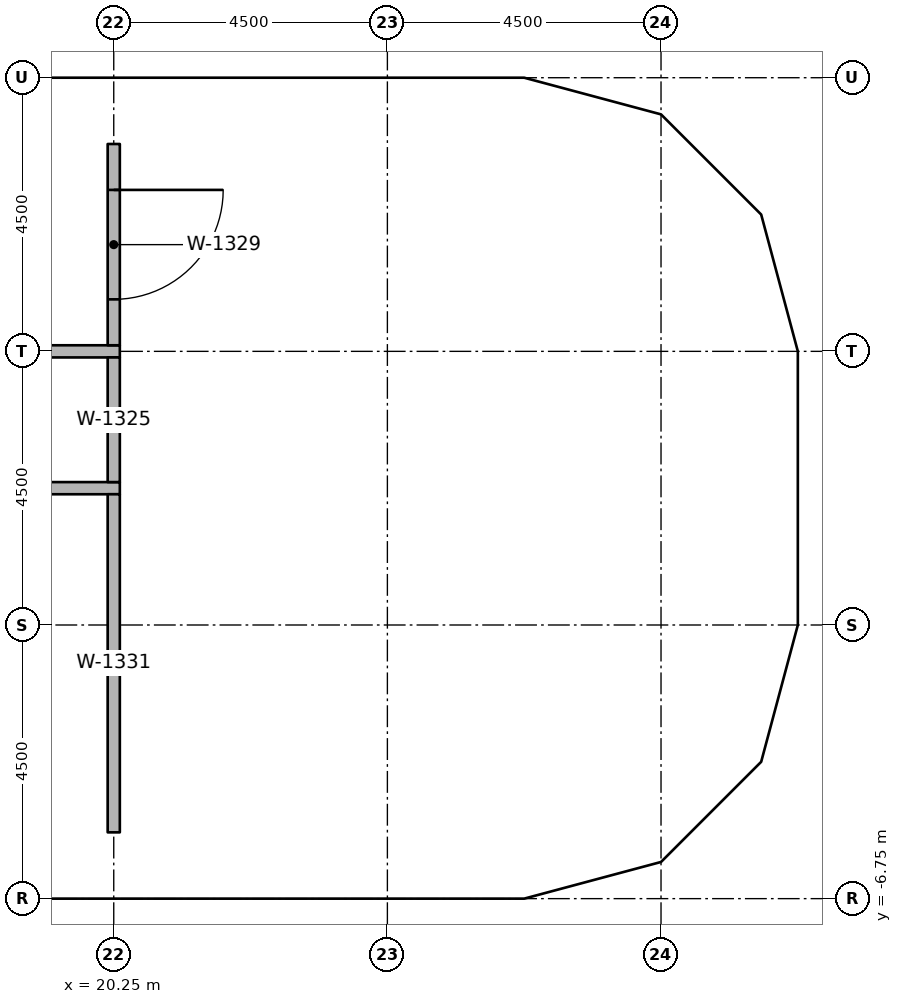
"""IFC4 building model, lengths in metres.
Left out: names, types, materials, properties, quantities, classifications, styles, units other than length and angle.
Written with IfcOpenShell. Run it as: python <this file> out.ifc"""

import sys

from ifc_helpers import new_model, si_unit, direction, frame, frame_2d, origin, origin_2d, place, context, subcontext, project, spatial, rectangle, extrude, element, fill, save


model = new_model("IFC4")
c1 = context("Model", 3, precision=1e-05, world=origin(), true_north=direction((0.0, 1.0)))
c2 = subcontext(c1, "Body", "Model", "MODEL_VIEW")
j1 = project(units=[si_unit("LENGTHUNIT", "METRE"), si_unit("PLANEANGLEUNIT", "RADIAN")], contexts=[c1])
p1 = place(None, origin())
s1 = spatial("IfcSite", under=j1, at=p1, CompositionType="ELEMENT")
p2 = place(p1, origin())
s2 = spatial("IfcBuilding", under=s1, at=p2, CompositionType="ELEMENT")
p3 = place(p2, frame((0.0, 0.0, 132.2)))
s3 = spatial("IfcBuildingStorey", under=s2, at=p3, CompositionType="ELEMENT", Elevation=132.2)
for number, where, z_axis, x_axis in (
    (1, (20.25, -6.11, 0.0), (0.0, 0.0, 1.0), (1.0, 0.0, 0.0)),
    (2, (20.25, 6.11, 0.0), (0.0, 0.0, 1.0), (1.0, 0.0, 0.0)),
    (3, (24.75, -6.11, 0.0), (0.0, 0.0, 1.0), (1.0, 0.0, 0.0)),
    (4, (24.75, 6.11, 0.0), (0.0, 0.0, 1.0), (1.0, 0.0, 0.0)),
    (5, (28.908, -5.475, 0.0), (0.0, 0.0, 1.0), (1.0, 0.0, 0.0)),
    (6, (28.67, -2.25, 0.0), (0.0, 0.0, 1.0), (1.0, 0.0, 0.0)),
    (7, (28.67, 2.25, 0.0), (0.0, 0.0, 1.0), (1.0, 0.0, 0.0)),
    (8, (28.908, 5.475, 0.0), (0.0, 0.0, 1.0), (1.0, 0.0, 0.0)),
):
    element("IfcColumn", number, at=place(p3, frame(where, z_axis=z_axis, x_axis=x_axis)), inside=s3, PredefinedType="COLUMN", context=c2, shape_type="SweptSolid", body=[
        extrude(rectangle(XDim=0.9, YDim=0.9, at=origin_2d()), origin(), (0.0, 0.0, 1.0), 3.65),
    ])
p4 = place(p3, frame((15.65, 2.25, 0.0), z_axis=(0.0, 0.0, 1.0), x_axis=(1.0, 0.0, 0.0)))
e9 = element("IfcWall", 9, at=p4, inside=s3, PredefinedType="PARTITIONING", context=c2, shape_type="SweptSolid", body=[
    extrude(rectangle(XDim=4.7, YDim=0.2, at=frame_2d((2.35, 0.0))), origin(), (0.0, 0.0, 1.0), 2.738),
])
p5 = place(p4, frame((1.85, 0.0, 0.0)))
e10 = element("IfcOpeningElement", 10, at=p5, cuts=e9, PredefinedType="OPENING", context=c2, shape_type="SweptSolid", body=[
    extrude(rectangle(XDim=1.0, YDim=2.1, at=frame_2d((0.5, 1.05))), frame((0.0, 0.11, 0.0), z_axis=(0.0, -1.0, 0.0), x_axis=(1.0, 0.0, 0.0)), (0.0, 0.0, 1.0), 0.22),
])
p6 = place(p3, frame((20.35, 0.0, 0.0), z_axis=(0.0, 0.0, 1.0), x_axis=(-1.0, 0.0, 0.0)))
e11 = element("IfcWall", 11, at=p6, inside=s3, PredefinedType="PARTITIONING", context=c2, shape_type="SweptSolid", body=[
    extrude(rectangle(XDim=4.7, YDim=0.2, at=frame_2d((2.35, 0.0))), origin(), (0.0, 0.0, 1.0), 2.738),
])
p7 = place(p6, frame((1.85, 0.0, 0.0)))
e12 = element("IfcOpeningElement", 12, at=p7, cuts=e11, PredefinedType="OPENING", context=c2, shape_type="SweptSolid", body=[
    extrude(rectangle(XDim=1.0, YDim=2.1, at=frame_2d((0.5, 1.05))), frame((0.0, 0.11, 0.0), z_axis=(0.0, -1.0, 0.0), x_axis=(1.0, 0.0, 0.0)), (0.0, 0.0, 1.0), 0.22),
])
p8 = place(p3, frame((20.25, 0.1, 0.0), z_axis=(0.0, 0.0, 1.0), x_axis=(0.0, 1.0, 0.0)))
e13 = element("IfcWall", 13, at=p8, inside=s3, PredefinedType="PARTITIONING", context=c2, shape_type="SweptSolid", body=[
    extrude(rectangle(XDim=2.05, YDim=0.2, at=frame_2d((1.025, 0.0))), origin(), (0.0, 0.0, 1.0), 2.738),
])
p9 = place(p3, frame((20.25, 5.66, 0.0), z_axis=(0.0, 0.0, 1.0), x_axis=(0.0, -1.0, 0.0)))
e14 = element("IfcWall", 14, at=p9, inside=s3, PredefinedType="PARTITIONING", context=c2, shape_type="SweptSolid", body=[
    extrude(rectangle(XDim=3.31, YDim=0.2, at=frame_2d((1.655, 0.0))), origin(), (0.0, 0.0, 1.0), 2.738),
])
p10 = place(p9, frame((0.755, 0.0, 0.0)))
e15 = element("IfcOpeningElement", 15, at=p10, cuts=e14, PredefinedType="OPENING", context=c2, shape_type="SweptSolid", body=[
    extrude(rectangle(XDim=1.8, YDim=2.1, at=frame_2d((0.9, 1.05))), frame((0.0, 0.11, 0.0), z_axis=(0.0, -1.0, 0.0), x_axis=(1.0, 0.0, 0.0)), (0.0, 0.0, 1.0), 0.22),
])
p11 = place(p3, frame((20.25, -5.66, 0.0), z_axis=(0.0, 0.0, 1.0), x_axis=(0.0, 1.0, 0.0)))
e16 = element("IfcWall", 16, at=p11, inside=s3, PredefinedType="PARTITIONING", context=c2, shape_type="SweptSolid", body=[
    extrude(rectangle(XDim=5.56, YDim=0.2, at=frame_2d((2.78, 0.0))), origin(), (0.0, 0.0, 1.0), 2.738),
])
p12 = place(p10, origin())
e17 = element("IfcDoor", 17, at=p12, inside=s3, OperationType="DOUBLE_DOOR_SINGLE_SWING", PredefinedType="DOOR", context=c2, shape_type="SweptSolid", body=[
    extrude(rectangle(XDim=1.8, YDim=2.1, at=frame_2d((0.9, 1.05))), frame((0.0, 0.025, 0.0), z_axis=(0.0, -1.0, 0.0), x_axis=(1.0, 0.0, 0.0)), (0.0, 0.0, 1.0), 0.05),
])
fill(e15, e17)
save(model, sys.argv[1])
